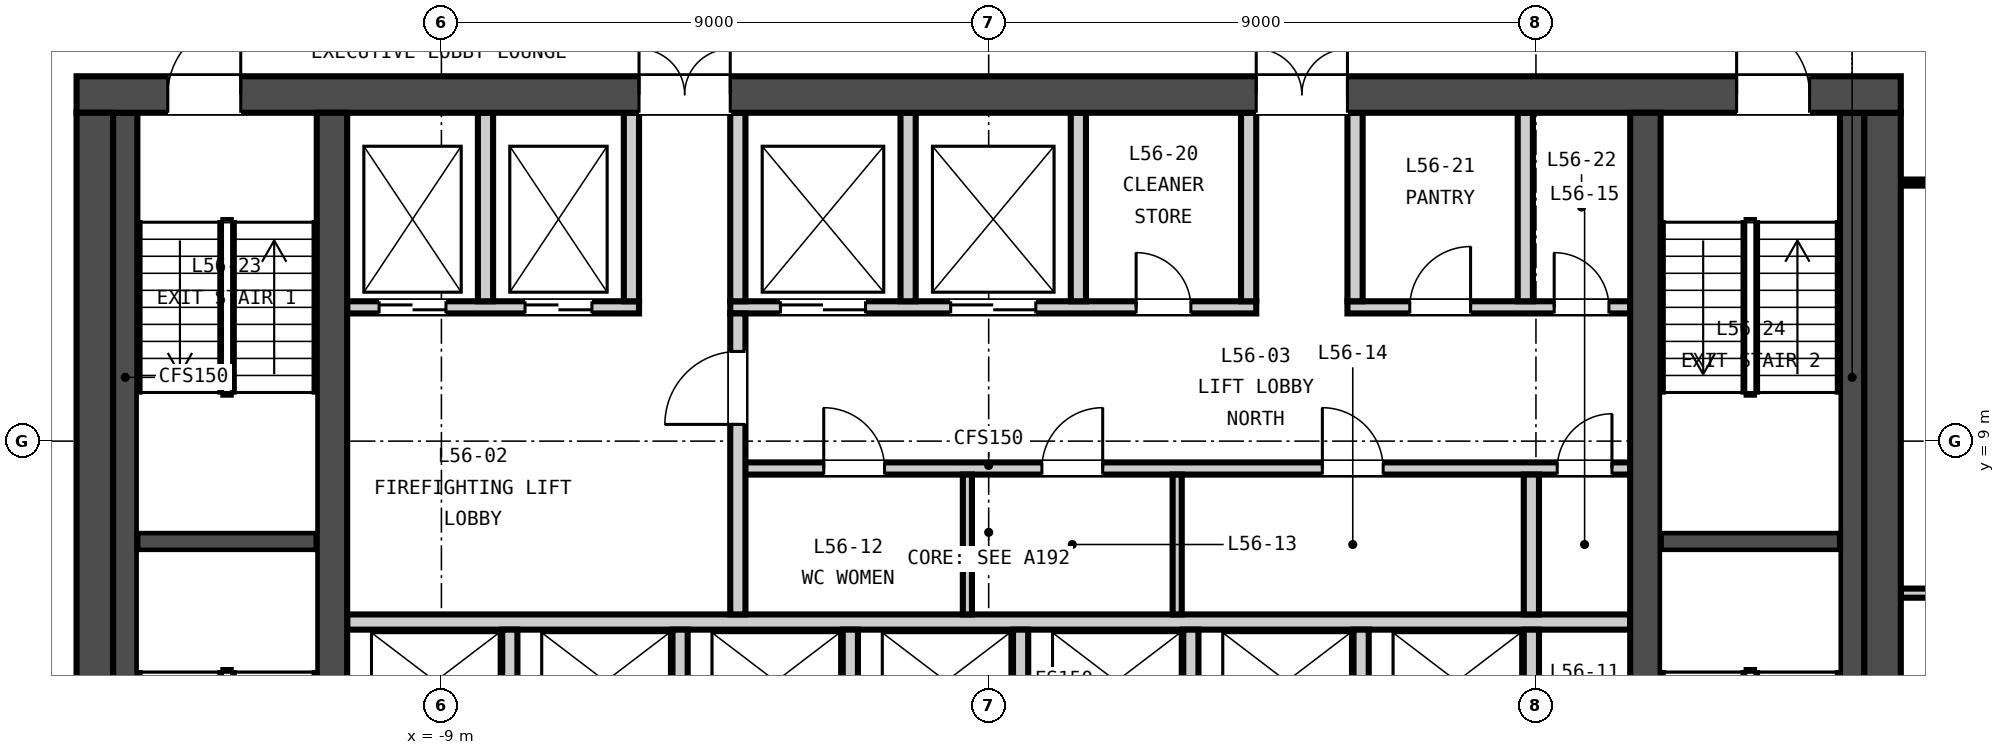
"""IFC4 building model, lengths in metres.
Left out: names, types, materials, properties, quantities, classifications, styles, units other than length and angle.
Written with IfcOpenShell. Run it as: python <this file> out.ifc"""

import sys

from ifc_helpers import new_model, si_unit, direction, frame, frame_2d, origin, place, context, subcontext, project, spatial, rectangle, extrude, element, fill, save


model = new_model("IFC4")
c1 = context("Model", 3, precision=1e-05, world=origin(), true_north=direction((0.0, 1.0)))
c2 = subcontext(c1, "Body", "Model", "MODEL_VIEW")
j1 = project(units=[si_unit("LENGTHUNIT", "METRE"), si_unit("PLANEANGLEUNIT", "RADIAN")], contexts=[c1])
p1 = place(None, origin())
s1 = spatial("IfcSite", under=j1, at=p1, CompositionType="ELEMENT")
p2 = place(p1, origin())
s2 = spatial("IfcBuilding", under=s1, at=p2, CompositionType="ELEMENT")
p3 = place(p2, frame((0.0, 0.0, 223.6)))
s3 = spatial("IfcBuildingStorey", under=s2, at=p3, CompositionType="ELEMENT", Elevation=223.6)
p4 = place(p3, frame((-15.0, 14.7, -0.15), z_axis=(0.0, 0.0, 1.0), x_axis=(1.0, 0.0, 0.0)))
e1 = element("IfcWall", 1, at=p4, inside=s3, PredefinedType="SOLIDWALL", context=c2, shape_type="SweptSolid", body=[
    extrude(rectangle(XDim=30.0, YDim=0.6, at=frame_2d((15.0, 0.0))), origin(), (0.0, 0.0, 1.0), 3.65),
])
p5 = place(p4, frame((9.25, 0.0, 0.15)))
e2 = element("IfcOpeningElement", 2, at=p5, cuts=e1, PredefinedType="OPENING", context=c2, shape_type="SweptSolid", body=[
    extrude(rectangle(XDim=1.5, YDim=2.1, at=frame_2d((0.75, 1.05))), frame((0.0, 0.31, 0.0), z_axis=(0.0, -1.0, 0.0), x_axis=(1.0, 0.0, 0.0)), (0.0, 0.0, 1.0), 0.62),
])
p6 = place(p4, frame((19.4, 0.0, 0.15)))
e3 = element("IfcOpeningElement", 3, at=p6, cuts=e1, PredefinedType="OPENING", context=c2, shape_type="SweptSolid", body=[
    extrude(rectangle(XDim=1.5, YDim=2.1, at=frame_2d((0.75, 1.05))), frame((0.0, 0.31, 0.0), z_axis=(0.0, -1.0, 0.0), x_axis=(1.0, 0.0, 0.0)), (0.0, 0.0, 1.0), 0.62),
])
p7 = place(p4, frame((1.5, 0.0, 0.15)))
e4 = element("IfcOpeningElement", 4, at=p7, cuts=e1, PredefinedType="OPENING", context=c2, shape_type="SweptSolid", body=[
    extrude(rectangle(XDim=1.2, YDim=2.1, at=frame_2d((0.6, 1.05))), frame((0.0, 0.31, 0.0), z_axis=(0.0, -1.0, 0.0), x_axis=(1.0, 0.0, 0.0)), (0.0, 0.0, 1.0), 0.62),
])
p8 = place(p4, frame((27.3, 0.0, 0.15)))
e5 = element("IfcOpeningElement", 5, at=p8, cuts=e1, PredefinedType="OPENING", context=c2, shape_type="SweptSolid", body=[
    extrude(rectangle(XDim=1.2, YDim=2.1, at=frame_2d((0.6, 1.05))), frame((0.0, 0.31, 0.0), z_axis=(0.0, -1.0, 0.0), x_axis=(1.0, 0.0, 0.0)), (0.0, 0.0, 1.0), 0.62),
])
for number, where, z_axis, x_axis in (
    (6, (-14.7, 0.6, -0.15), (0.0, 0.0, 1.0), (0.0, 1.0, 0.0)),
    (7, (14.7, 0.6, -0.15), (0.0, 0.0, 1.0), (0.0, 1.0, 0.0)),
):
    element("IfcWall", number, at=place(p3, frame(where, z_axis=z_axis, x_axis=x_axis)), inside=s3, PredefinedType="SOLIDWALL", context=c2, shape_type="SweptSolid", body=[
        extrude(rectangle(XDim=13.8, YDim=0.6, at=frame_2d((6.9, 0.0))), origin(), (0.0, 0.0, 1.0), 3.65),
    ])
for number, where, z_axis, x_axis in (
    (8, (-10.8, 0.6, -0.15), (0.0, 0.0, 1.0), (0.0, 1.0, 0.0)),
    (9, (10.8, 0.6, -0.15), (0.0, 0.0, 1.0), (0.0, 1.0, 0.0)),
):
    element("IfcWall", number, at=place(p3, frame(where, z_axis=z_axis, x_axis=x_axis)), inside=s3, PredefinedType="SOLIDWALL", context=c2, shape_type="SweptSolid", body=[
        extrude(rectangle(XDim=13.8, YDim=0.5, at=frame_2d((6.9, 0.0))), origin(), (0.0, 0.0, 1.0), 3.65),
    ])
p9 = place(p3, frame((-10.55, 6.025, 0.0), z_axis=(0.0, 0.0, 1.0), x_axis=(1.0, 0.0, 0.0)))
e10 = element("IfcWall", 10, at=p9, inside=s3, PredefinedType="PARTITIONING", context=c2, shape_type="SweptSolid", body=[
    extrude(rectangle(XDim=21.1, YDim=0.25, at=frame_2d((10.55, 0.0))), origin(), (0.0, 0.0, 1.0), 3.5),
])
p10 = place(p3, frame((-4.125, 8.55, 0.0), z_axis=(0.0, 0.0, 1.0), x_axis=(1.0, 0.0, 0.0)))
e11 = element("IfcWall", 11, at=p10, inside=s3, PredefinedType="PARTITIONING", context=c2, shape_type="SweptSolid", body=[
    extrude(rectangle(XDim=14.675, YDim=0.2, at=frame_2d((7.337, 0.0))), origin(), (0.0, 0.0, 1.0), 3.5),
])
p11 = place(p10, frame((1.413, 0.0, 0.0)))
e12 = element("IfcOpeningElement", 12, at=p11, cuts=e11, PredefinedType="OPENING", context=c2, shape_type="SweptSolid", body=[
    extrude(rectangle(XDim=1.0, YDim=2.1, at=frame_2d((0.5, 1.05))), frame((0.0, 0.11, 0.0), z_axis=(0.0, -1.0, 0.0), x_axis=(1.0, 0.0, 0.0)), (0.0, 0.0, 1.0), 0.22),
])
p12 = place(p10, frame((5.0, 0.0, 0.0)))
e13 = element("IfcOpeningElement", 13, at=p12, cuts=e11, PredefinedType="OPENING", context=c2, shape_type="SweptSolid", body=[
    extrude(rectangle(XDim=1.0, YDim=2.1, at=frame_2d((0.5, 1.05))), frame((0.0, 0.11, 0.0), z_axis=(0.0, -1.0, 0.0), x_axis=(1.0, 0.0, 0.0)), (0.0, 0.0, 1.0), 0.22),
])
p13 = place(p10, frame((9.613, 0.0, 0.0)))
e14 = element("IfcOpeningElement", 14, at=p13, cuts=e11, PredefinedType="OPENING", context=c2, shape_type="SweptSolid", body=[
    extrude(rectangle(XDim=1.0, YDim=2.1, at=frame_2d((0.5, 1.05))), frame((0.0, 0.11, 0.0), z_axis=(0.0, -1.0, 0.0), x_axis=(1.0, 0.0, 0.0)), (0.0, 0.0, 1.0), 0.22),
])
p14 = place(p10, frame((13.475, 0.0, 0.0)))
e15 = element("IfcOpeningElement", 15, at=p14, cuts=e11, PredefinedType="OPENING", context=c2, shape_type="SweptSolid", body=[
    extrude(rectangle(XDim=0.9, YDim=2.1, at=frame_2d((0.45, 1.05))), frame((0.0, 0.11, 0.0), z_axis=(0.0, -1.0, 0.0), x_axis=(1.0, 0.0, 0.0)), (0.0, 0.0, 1.0), 0.22),
])
p15 = place(p3, frame((-10.55, 11.2, 0.0), z_axis=(0.0, 0.0, 1.0), x_axis=(1.0, 0.0, 0.0)))
e16 = element("IfcWall", 16, at=p15, inside=s3, PredefinedType="PARTITIONING", context=c2, shape_type="SweptSolid", body=[
    extrude(rectangle(XDim=4.8, YDim=0.2, at=frame_2d((2.4, 0.0))), origin(), (0.0, 0.0, 1.0), 3.5),
])
p16 = place(p15, frame((0.525, 0.0, 0.0)))
e17 = element("IfcOpeningElement", 17, at=p16, cuts=e16, PredefinedType="OPENING", context=c2, shape_type="SweptSolid", body=[
    extrude(rectangle(XDim=1.1, YDim=2.1, at=frame_2d((0.55, 1.05))), frame((0.0, 0.11, 0.0), z_axis=(0.0, -1.0, 0.0), x_axis=(1.0, 0.0, 0.0)), (0.0, 0.0, 1.0), 0.22),
])
p17 = place(p15, frame((2.925, 0.0, 0.0)))
e18 = element("IfcOpeningElement", 18, at=p17, cuts=e16, PredefinedType="OPENING", context=c2, shape_type="SweptSolid", body=[
    extrude(rectangle(XDim=1.1, YDim=2.1, at=frame_2d((0.55, 1.05))), frame((0.0, 0.11, 0.0), z_axis=(0.0, -1.0, 0.0), x_axis=(1.0, 0.0, 0.0)), (0.0, 0.0, 1.0), 0.22),
])
p18 = place(p3, frame((-4.25, 11.2, 0.0), z_axis=(0.0, 0.0, 1.0), x_axis=(1.0, 0.0, 0.0)))
e19 = element("IfcWall", 19, at=p18, inside=s3, PredefinedType="PARTITIONING", context=c2, shape_type="SweptSolid", body=[
    extrude(rectangle(XDim=8.65, YDim=0.2, at=frame_2d((4.325, 0.0))), origin(), (0.0, 0.0, 1.0), 3.5),
])
p19 = place(p18, frame((0.825, 0.0, 0.0)))
e20 = element("IfcOpeningElement", 20, at=p19, cuts=e19, PredefinedType="OPENING", context=c2, shape_type="SweptSolid", body=[
    extrude(rectangle(XDim=1.4, YDim=2.1, at=frame_2d((0.7, 1.05))), frame((0.0, 0.11, 0.0), z_axis=(0.0, -1.0, 0.0), x_axis=(1.0, 0.0, 0.0)), (0.0, 0.0, 1.0), 0.22),
])
p20 = place(p18, frame((3.625, 0.0, 0.0)))
e21 = element("IfcOpeningElement", 21, at=p20, cuts=e19, PredefinedType="OPENING", context=c2, shape_type="SweptSolid", body=[
    extrude(rectangle(XDim=1.4, YDim=2.1, at=frame_2d((0.7, 1.05))), frame((0.0, 0.11, 0.0), z_axis=(0.0, -1.0, 0.0), x_axis=(1.0, 0.0, 0.0)), (0.0, 0.0, 1.0), 0.22),
])
p21 = place(p18, frame((6.675, 0.0, 0.0)))
e22 = element("IfcOpeningElement", 22, at=p21, cuts=e19, PredefinedType="OPENING", context=c2, shape_type="SweptSolid", body=[
    extrude(rectangle(XDim=0.9, YDim=2.1, at=frame_2d((0.45, 1.05))), frame((0.0, 0.11, 0.0), z_axis=(0.0, -1.0, 0.0), x_axis=(1.0, 0.0, 0.0)), (0.0, 0.0, 1.0), 0.22),
])
p22 = place(p3, frame((5.9, 11.2, 0.0), z_axis=(0.0, 0.0, 1.0), x_axis=(1.0, 0.0, 0.0)))
e23 = element("IfcWall", 23, at=p22, inside=s3, PredefinedType="PARTITIONING", context=c2, shape_type="SweptSolid", body=[
    extrude(rectangle(XDim=4.65, YDim=0.2, at=frame_2d((2.325, 0.0))), origin(), (0.0, 0.0, 1.0), 3.5),
])
p23 = place(p22, frame((1.025, 0.0, 0.0)))
e24 = element("IfcOpeningElement", 24, at=p23, cuts=e23, PredefinedType="OPENING", context=c2, shape_type="SweptSolid", body=[
    extrude(rectangle(XDim=1.0, YDim=2.1, at=frame_2d((0.5, 1.05))), frame((0.0, 0.11, 0.0), z_axis=(0.0, -1.0, 0.0), x_axis=(1.0, 0.0, 0.0)), (0.0, 0.0, 1.0), 0.22),
])
p24 = place(p22, frame((3.4, 0.0, 0.0)))
e25 = element("IfcOpeningElement", 25, at=p24, cuts=e23, PredefinedType="OPENING", context=c2, shape_type="SweptSolid", body=[
    extrude(rectangle(XDim=0.9, YDim=2.1, at=frame_2d((0.45, 1.05))), frame((0.0, 0.11, 0.0), z_axis=(0.0, -1.0, 0.0), x_axis=(1.0, 0.0, 0.0)), (0.0, 0.0, 1.0), 0.22),
])
p25 = place(p3, frame((-4.125, 6.15, 0.0), z_axis=(0.0, 0.0, 1.0), x_axis=(0.0, 1.0, 0.0)))
e26 = element("IfcWall", 26, at=p25, inside=s3, PredefinedType="PARTITIONING", context=c2, shape_type="SweptSolid", body=[
    extrude(rectangle(XDim=4.95, YDim=0.25, at=frame_2d((2.475, 0.0))), origin(), (0.0, 0.0, 1.0), 3.5),
])
p26 = place(p25, frame((3.125, 0.0, 0.0)))
e27 = element("IfcOpeningElement", 27, at=p26, cuts=e26, PredefinedType="OPENING", context=c2, shape_type="SweptSolid", body=[
    extrude(rectangle(XDim=1.2, YDim=2.1, at=frame_2d((0.6, 1.05))), frame((0.0, 0.135, 0.0), z_axis=(0.0, -1.0, 0.0), x_axis=(1.0, 0.0, 0.0)), (0.0, 0.0, 1.0), 0.27),
])
for number, where, z_axis, x_axis in (
    (28, (-7.875, 3.6, 0.0), (0.0, 0.0, 1.0), (0.0, 1.0, 0.0)),
    (29, (-5.075, 3.6, 0.0), (0.0, 0.0, 1.0), (0.0, 1.0, 0.0)),
    (30, (-2.275, 3.6, 0.0), (0.0, 0.0, 1.0), (0.0, 1.0, 0.0)),
    (31, (0.525, 3.6, 0.0), (0.0, 0.0, 1.0), (0.0, 1.0, 0.0)),
    (32, (3.325, 3.6, 0.0), (0.0, 0.0, 1.0), (0.0, 1.0, 0.0)),
    (33, (6.125, 3.6, 0.0), (0.0, 0.0, 1.0), (0.0, 1.0, 0.0)),
    (34, (8.925, 3.6, 0.0), (0.0, 0.0, 1.0), (0.0, 1.0, 0.0)),
):
    element("IfcWall", number, at=place(p3, frame(where, z_axis=z_axis, x_axis=x_axis)), inside=s3, PredefinedType="PARTITIONING", context=c2, shape_type="SweptSolid", body=[
        extrude(rectangle(XDim=2.3, YDim=0.25, at=frame_2d((1.15, 0.0))), origin(), (0.0, 0.0, 1.0), 3.5),
    ])
for number, where, z_axis, x_axis in (
    (35, (-0.35, 6.15, 0.0), (0.0, 0.0, 1.0), (0.0, 1.0, 0.0)),
    (36, (3.1, 6.15, 0.0), (0.0, 0.0, 1.0), (0.0, 1.0, 0.0)),
):
    element("IfcWall", number, at=place(p3, frame(where, z_axis=z_axis, x_axis=x_axis)), inside=s3, PredefinedType="PARTITIONING", context=c2, shape_type="SweptSolid", body=[
        extrude(rectangle(XDim=2.3, YDim=0.15, at=frame_2d((1.15, 0.0))), origin(), (0.0, 0.0, 1.0), 3.5),
    ])
p27 = place(p3, frame((8.925, 6.15, 0.0), z_axis=(0.0, 0.0, 1.0), x_axis=(0.0, 1.0, 0.0)))
e37 = element("IfcWall", 37, at=p27, inside=s3, PredefinedType="PARTITIONING", context=c2, shape_type="SweptSolid", body=[
    extrude(rectangle(XDim=2.3, YDim=0.25, at=frame_2d((1.15, 0.0))), origin(), (0.0, 0.0, 1.0), 3.5),
])
for number, where, z_axis, x_axis in (
    (38, (-8.275, 11.3, 0.0), (0.0, 0.0, 1.0), (0.0, 1.0, 0.0)),
    (39, (-5.875, 11.3, 0.0), (0.0, 0.0, 1.0), (0.0, 1.0, 0.0)),
    (40, (-4.125, 11.3, 0.0), (0.0, 0.0, 1.0), (0.0, 1.0, 0.0)),
    (41, (-1.325, 11.3, 0.0), (0.0, 0.0, 1.0), (0.0, 1.0, 0.0)),
    (42, (1.475, 11.3, 0.0), (0.0, 0.0, 1.0), (0.0, 1.0, 0.0)),
    (43, (4.275, 11.3, 0.0), (0.0, 0.0, 1.0), (0.0, 1.0, 0.0)),
    (44, (6.025, 11.3, 0.0), (0.0, 0.0, 1.0), (0.0, 1.0, 0.0)),
    (45, (8.825, 11.3, 0.0), (0.0, 0.0, 1.0), (0.0, 1.0, 0.0)),
):
    element("IfcWall", number, at=place(p3, frame(where, z_axis=z_axis, x_axis=x_axis)), inside=s3, PredefinedType="PARTITIONING", context=c2, shape_type="SweptSolid", body=[
        extrude(rectangle(XDim=3.1, YDim=0.25, at=frame_2d((1.55, 0.0))), origin(), (0.0, 0.0, 1.0), 3.5),
    ])
p28 = place(p3, frame((-14.0, 7.35, 0.0), z_axis=(0.0, 0.0, 1.0), x_axis=(1.0, 0.0, 0.0)))
e46 = element("IfcWall", 46, at=p28, inside=s3, PredefinedType="SOLIDWALL", context=c2, shape_type="SweptSolid", body=[
    extrude(rectangle(XDim=2.95, YDim=0.3, at=frame_2d((1.475, 0.0))), origin(), (0.0, 0.0, 1.0), 3.5),
])
p29 = place(p3, frame((-14.2, 0.6, 0.0), z_axis=(0.0, 0.0, 1.0), x_axis=(0.0, 1.0, 0.0)))
e47 = element("IfcWall", 47, at=p29, inside=s3, PredefinedType="SOLIDWALL", context=c2, shape_type="SweptSolid", body=[
    extrude(rectangle(XDim=13.8, YDim=0.4, at=frame_2d((6.9, 0.0))), origin(), (0.0, 0.0, 1.0), 3.5),
])
p30 = place(p3, frame((11.05, 7.35, 0.0), z_axis=(0.0, 0.0, 1.0), x_axis=(1.0, 0.0, 0.0)))
e48 = element("IfcWall", 48, at=p30, inside=s3, PredefinedType="SOLIDWALL", context=c2, shape_type="SweptSolid", body=[
    extrude(rectangle(XDim=2.95, YDim=0.3, at=frame_2d((1.475, 0.0))), origin(), (0.0, 0.0, 1.0), 3.5),
])
p31 = place(p3, frame((14.2, 0.6, 0.0), z_axis=(0.0, 0.0, 1.0), x_axis=(0.0, 1.0, 0.0)))
e49 = element("IfcWall", 49, at=p31, inside=s3, PredefinedType="SOLIDWALL", context=c2, shape_type="SweptSolid", body=[
    extrude(rectangle(XDim=13.8, YDim=0.4, at=frame_2d((6.9, 0.0))), origin(), (0.0, 0.0, 1.0), 3.5),
])
p32 = place(p3, frame((15.0, 13.252, 0.0), z_axis=(0.0, 0.0, 1.0), x_axis=(1.0, 0.0, 0.0)))
e50 = element("IfcWall", 50, at=p32, inside=s3, PredefinedType="PARTITIONING", context=c2, shape_type="SweptSolid", body=[
    extrude(rectangle(XDim=5.166, YDim=0.1, at=frame_2d((2.583, 0.0))), origin(), (0.0, 0.0, 1.0), 2.75),
])
p33 = place(p3, frame((15.0, 6.5, 0.0), z_axis=(0.0, 0.0, 1.0), x_axis=(1.0, 0.0, 0.0)))
e51 = element("IfcWall", 51, at=p33, inside=s3, PredefinedType="PARTITIONING", context=c2, shape_type="SweptSolid", body=[
    extrude(rectangle(XDim=2.925, YDim=0.15, at=frame_2d((1.462, 0.0))), origin(), (0.0, 0.0, 1.0), 2.75),
])
p34 = place(p26, origin())
e52 = element("IfcDoor", 52, at=p34, inside=s3, OperationType="SINGLE_SWING_LEFT", PredefinedType="DOOR", context=c2, shape_type="SweptSolid", body=[
    extrude(rectangle(XDim=1.2, YDim=2.1, at=frame_2d((0.6, 1.05))), frame((0.0, 0.025, 0.0), z_axis=(0.0, -1.0, 0.0), x_axis=(1.0, 0.0, 0.0)), (0.0, 0.0, 1.0), 0.05),
])
fill(e27, e52)
p35 = place(p11, origin())
e53 = element("IfcDoor", 53, at=p35, inside=s3, OperationType="SINGLE_SWING_LEFT", PredefinedType="DOOR", context=c2, shape_type="SweptSolid", body=[
    extrude(rectangle(XDim=1.0, YDim=2.1, at=frame_2d((0.5, 1.05))), frame((0.0, 0.025, 0.0), z_axis=(0.0, -1.0, 0.0), x_axis=(1.0, 0.0, 0.0)), (0.0, 0.0, 1.0), 0.05),
])
fill(e12, e53)
p36 = place(p12, origin())
e54 = element("IfcDoor", 54, at=p36, inside=s3, OperationType="SINGLE_SWING_RIGHT", PredefinedType="DOOR", context=c2, shape_type="SweptSolid", body=[
    extrude(rectangle(XDim=1.0, YDim=2.1, at=frame_2d((0.5, 1.05))), frame((0.0, 0.025, 0.0), z_axis=(0.0, -1.0, 0.0), x_axis=(1.0, 0.0, 0.0)), (0.0, 0.0, 1.0), 0.05),
])
fill(e13, e54)
p37 = place(p13, origin())
e55 = element("IfcDoor", 55, at=p37, inside=s3, OperationType="SINGLE_SWING_LEFT", PredefinedType="DOOR", context=c2, shape_type="SweptSolid", body=[
    extrude(rectangle(XDim=1.0, YDim=2.1, at=frame_2d((0.5, 1.05))), frame((0.0, 0.025, 0.0), z_axis=(0.0, -1.0, 0.0), x_axis=(1.0, 0.0, 0.0)), (0.0, 0.0, 1.0), 0.05),
])
fill(e14, e55)
p38 = place(p14, origin())
e56 = element("IfcDoor", 56, at=p38, inside=s3, OperationType="SINGLE_SWING_RIGHT", PredefinedType="DOOR", context=c2, shape_type="SweptSolid", body=[
    extrude(rectangle(XDim=0.9, YDim=2.1, at=frame_2d((0.45, 1.05))), frame((0.0, 0.025, 0.0), z_axis=(0.0, -1.0, 0.0), x_axis=(1.0, 0.0, 0.0)), (0.0, 0.0, 1.0), 0.05),
])
fill(e15, e56)
p39 = place(p16, origin())
e57 = element("IfcDoor", 57, at=p39, inside=s3, OperationType="DOUBLE_DOOR_SLIDING", PredefinedType="DOOR", context=c2, shape_type="SweptSolid", body=[
    extrude(rectangle(XDim=1.1, YDim=2.1, at=frame_2d((0.55, 1.05))), frame((0.0, 0.025, 0.0), z_axis=(0.0, -1.0, 0.0), x_axis=(1.0, 0.0, 0.0)), (0.0, 0.0, 1.0), 0.05),
])
fill(e17, e57)
p40 = place(p17, origin())
e58 = element("IfcDoor", 58, at=p40, inside=s3, OperationType="DOUBLE_DOOR_SLIDING", PredefinedType="DOOR", context=c2, shape_type="SweptSolid", body=[
    extrude(rectangle(XDim=1.1, YDim=2.1, at=frame_2d((0.55, 1.05))), frame((0.0, 0.025, 0.0), z_axis=(0.0, -1.0, 0.0), x_axis=(1.0, 0.0, 0.0)), (0.0, 0.0, 1.0), 0.05),
])
fill(e18, e58)
p41 = place(p19, origin())
e59 = element("IfcDoor", 59, at=p41, inside=s3, OperationType="DOUBLE_DOOR_SLIDING", PredefinedType="DOOR", context=c2, shape_type="SweptSolid", body=[
    extrude(rectangle(XDim=1.4, YDim=2.1, at=frame_2d((0.7, 1.05))), frame((0.0, 0.025, 0.0), z_axis=(0.0, -1.0, 0.0), x_axis=(1.0, 0.0, 0.0)), (0.0, 0.0, 1.0), 0.05),
])
fill(e20, e59)
p42 = place(p20, origin())
e60 = element("IfcDoor", 60, at=p42, inside=s3, OperationType="DOUBLE_DOOR_SLIDING", PredefinedType="DOOR", context=c2, shape_type="SweptSolid", body=[
    extrude(rectangle(XDim=1.4, YDim=2.1, at=frame_2d((0.7, 1.05))), frame((0.0, 0.025, 0.0), z_axis=(0.0, -1.0, 0.0), x_axis=(1.0, 0.0, 0.0)), (0.0, 0.0, 1.0), 0.05),
])
fill(e21, e60)
p43 = place(p21, origin())
e61 = element("IfcDoor", 61, at=p43, inside=s3, OperationType="SINGLE_SWING_LEFT", PredefinedType="DOOR", context=c2, shape_type="SweptSolid", body=[
    extrude(rectangle(XDim=0.9, YDim=2.1, at=frame_2d((0.45, 1.05))), frame((0.0, 0.025, 0.0), z_axis=(0.0, -1.0, 0.0), x_axis=(1.0, 0.0, 0.0)), (0.0, 0.0, 1.0), 0.05),
])
fill(e22, e61)
p44 = place(p23, origin())
e62 = element("IfcDoor", 62, at=p44, inside=s3, OperationType="SINGLE_SWING_RIGHT", PredefinedType="DOOR", context=c2, shape_type="SweptSolid", body=[
    extrude(rectangle(XDim=1.0, YDim=2.1, at=frame_2d((0.5, 1.05))), frame((0.0, 0.025, 0.0), z_axis=(0.0, -1.0, 0.0), x_axis=(1.0, 0.0, 0.0)), (0.0, 0.0, 1.0), 0.05),
])
fill(e24, e62)
p45 = place(p24, origin())
e63 = element("IfcDoor", 63, at=p45, inside=s3, OperationType="SINGLE_SWING_LEFT", PredefinedType="DOOR", context=c2, shape_type="SweptSolid", body=[
    extrude(rectangle(XDim=0.9, YDim=2.1, at=frame_2d((0.45, 1.05))), frame((0.0, 0.025, 0.0), z_axis=(0.0, -1.0, 0.0), x_axis=(1.0, 0.0, 0.0)), (0.0, 0.0, 1.0), 0.05),
])
fill(e25, e63)
p46 = place(p5, origin())
e64 = element("IfcDoor", 64, at=p46, inside=s3, OperationType="DOUBLE_DOOR_SINGLE_SWING", PredefinedType="DOOR", context=c2, shape_type="SweptSolid", body=[
    extrude(rectangle(XDim=1.5, YDim=2.1, at=frame_2d((0.75, 1.05))), frame((0.0, 0.025, 0.0), z_axis=(0.0, -1.0, 0.0), x_axis=(1.0, 0.0, 0.0)), (0.0, 0.0, 1.0), 0.05),
])
fill(e2, e64)
p47 = place(p6, origin())
e65 = element("IfcDoor", 65, at=p47, inside=s3, OperationType="DOUBLE_DOOR_SINGLE_SWING", PredefinedType="DOOR", context=c2, shape_type="SweptSolid", body=[
    extrude(rectangle(XDim=1.5, YDim=2.1, at=frame_2d((0.75, 1.05))), frame((0.0, 0.025, 0.0), z_axis=(0.0, -1.0, 0.0), x_axis=(1.0, 0.0, 0.0)), (0.0, 0.0, 1.0), 0.05),
])
fill(e3, e65)
p48 = place(p7, origin())
e66 = element("IfcDoor", 66, at=p48, inside=s3, OperationType="SINGLE_SWING_RIGHT", PredefinedType="DOOR", context=c2, shape_type="SweptSolid", body=[
    extrude(rectangle(XDim=1.2, YDim=2.1, at=frame_2d((0.6, 1.05))), frame((0.0, 0.025, 0.0), z_axis=(0.0, -1.0, 0.0), x_axis=(1.0, 0.0, 0.0)), (0.0, 0.0, 1.0), 0.05),
])
fill(e4, e66)
p49 = place(p8, origin())
e67 = element("IfcDoor", 67, at=p49, inside=s3, OperationType="SINGLE_SWING_LEFT", PredefinedType="DOOR", context=c2, shape_type="SweptSolid", body=[
    extrude(rectangle(XDim=1.2, YDim=2.1, at=frame_2d((0.6, 1.05))), frame((0.0, 0.025, 0.0), z_axis=(0.0, -1.0, 0.0), x_axis=(1.0, 0.0, 0.0)), (0.0, 0.0, 1.0), 0.05),
])
fill(e5, e67)
save(model, sys.argv[1])
